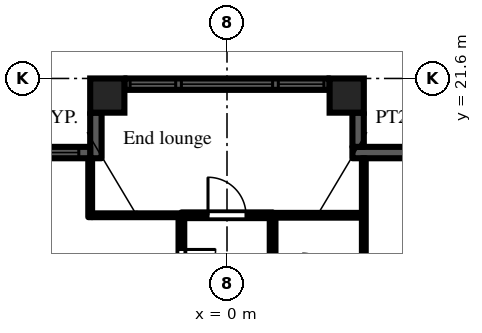
"""IFC4 building model, lengths in metres.
Left out: names, types, materials, properties, quantities, classifications, styles, units other than length and angle.
Written with IfcOpenShell. Run it as: python <this file> out.ifc"""

import sys

from ifc_helpers import new_model, si_unit, direction, frame, frame_2d, origin, origin_2d, place, context, subcontext, project, spatial, rectangle, extrude, element, fill, save


model = new_model("IFC4")
c1 = context("Model", 3, precision=1e-05, world=origin(), true_north=direction((0.0, 1.0)))
c2 = subcontext(c1, "Body", "Model", "MODEL_VIEW")
j1 = project(units=[si_unit("LENGTHUNIT", "METRE"), si_unit("PLANEANGLEUNIT", "RADIAN")], contexts=[c1])
p1 = place(None, origin())
s1 = spatial("IfcSite", under=j1, at=p1, CompositionType="ELEMENT")
p2 = place(p1, origin())
s2 = spatial("IfcBuilding", under=s1, at=p2, CompositionType="ELEMENT")
p3 = place(p2, frame((0.0, 0.0, 102.9)))
s3 = spatial("IfcBuildingStorey", under=s2, at=p3, CompositionType="ELEMENT", Elevation=102.9)
for number, where, z_axis, x_axis in (
    (1, (-3.15, 21.15, 0.0), (0.0, 0.0, 1.0), (1.0, 0.0, 0.0)),
    (2, (3.15, 21.15, 0.0), (0.0, 0.0, 1.0), (1.0, 0.0, 0.0)),
):
    element("IfcColumn", number, at=place(p3, frame(where, z_axis=z_axis, x_axis=x_axis)), inside=s3, PredefinedType="COLUMN", context=c2, shape_type="SweptSolid", body=[
        extrude(rectangle(XDim=0.9, YDim=0.9, at=origin_2d()), origin(), (0.0, 0.0, 1.0), 3.0),
    ])
p4 = place(p3, frame((5.1, 19.65, 0.0), z_axis=(0.0, 0.0, 1.0), x_axis=(-1.0, 0.0, 0.0)))
e3 = element("IfcWall", 3, at=p4, inside=s3, PredefinedType="SOLIDWALL", context=c2, shape_type="SweptSolid", body=[
    extrude(rectangle(XDim=1.8, YDim=0.3, at=frame_2d((0.9, 0.0))), origin(), (0.0, 0.0, 1.0), 2.575),
])
p5 = place(p3, frame((3.45, 19.8, 0.0), z_axis=(0.0, 0.0, 1.0), x_axis=(0.0, 1.0, 0.0)))
e4 = element("IfcWall", 4, at=p5, inside=s3, PredefinedType="SOLIDWALL", context=c2, shape_type="SweptSolid", body=[
    extrude(rectangle(XDim=0.9, YDim=0.3, at=frame_2d((0.45, 0.0))), origin(), (0.0, 0.0, 1.0), 2.575),
])
p6 = place(p3, frame((2.7, 21.45, 0.0), z_axis=(0.0, 0.0, 1.0), x_axis=(-1.0, 0.0, 0.0)))
e5 = element("IfcWall", 5, at=p6, inside=s3, PredefinedType="SOLIDWALL", context=c2, shape_type="SweptSolid", body=[
    extrude(rectangle(XDim=5.4, YDim=0.3, at=frame_2d((2.7, 0.0))), origin(), (0.0, 0.0, 1.0), 2.1),
])
p7 = place(p6, frame((1.5, 0.0, 0.2)))
e6 = element("IfcOpeningElement", 6, at=p7, cuts=e5, PredefinedType="OPENING", context=c2, shape_type="SweptSolid", body=[
    extrude(rectangle(XDim=2.4, YDim=1.85, at=frame_2d((1.2, 0.925))), frame((0.0, 0.16, 0.0), z_axis=(0.0, -1.0, 0.0), x_axis=(1.0, 0.0, 0.0)), (0.0, 0.0, 1.0), 0.32),
])
p8 = place(p6, frame((0.15, 0.0, 0.2)))
e7 = element("IfcOpeningElement", 7, at=p8, cuts=e5, PredefinedType="OPENING", context=c2, shape_type="SweptSolid", body=[
    extrude(rectangle(XDim=1.2, YDim=1.85, at=frame_2d((0.6, 0.925))), frame((0.0, 0.16, 0.0), z_axis=(0.0, -1.0, 0.0), x_axis=(1.0, 0.0, 0.0)), (0.0, 0.0, 1.0), 0.32),
])
p9 = place(p6, frame((4.05, 0.0, 0.2)))
e8 = element("IfcOpeningElement", 8, at=p9, cuts=e5, PredefinedType="OPENING", context=c2, shape_type="SweptSolid", body=[
    extrude(rectangle(XDim=1.2, YDim=1.85, at=frame_2d((0.6, 0.925))), frame((0.0, 0.16, 0.0), z_axis=(0.0, -1.0, 0.0), x_axis=(1.0, 0.0, 0.0)), (0.0, 0.0, 1.0), 0.32),
])
p10 = place(p3, frame((-3.45, 20.7, 0.0), z_axis=(0.0, 0.0, 1.0), x_axis=(0.0, -1.0, 0.0)))
e9 = element("IfcWall", 9, at=p10, inside=s3, PredefinedType="SOLIDWALL", context=c2, shape_type="SweptSolid", body=[
    extrude(rectangle(XDim=1.2, YDim=0.3, at=frame_2d((0.6, 0.0))), origin(), (0.0, 0.0, 1.0), 2.575),
])
p11 = place(p3, frame((-3.6, 19.65, 0.0), z_axis=(0.0, 0.0, 1.0), x_axis=(-1.0, 0.0, 0.0)))
e10 = element("IfcWall", 10, at=p11, inside=s3, PredefinedType="SOLIDWALL", context=c2, shape_type="SweptSolid", body=[
    extrude(rectangle(XDim=1.8, YDim=0.3, at=frame_2d((0.9, 0.0))), origin(), (0.0, 0.0, 1.0), 2.575),
])
p12 = place(p11, frame((0.3, 0.0, 0.2)))
e11 = element("IfcOpeningElement", 11, at=p12, cuts=e10, PredefinedType="OPENING", context=c2, shape_type="SweptSolid", body=[
    extrude(rectangle(XDim=1.2, YDim=1.85, at=frame_2d((0.6, 0.925))), frame((0.0, 0.16, 0.0), z_axis=(0.0, -1.0, 0.0), x_axis=(1.0, 0.0, 0.0)), (0.0, 0.0, 1.0), 0.32),
])
p13 = place(p3, frame((-3.6, 17.95, 0.0), z_axis=(0.0, 0.0, 1.0), x_axis=(0.0, 1.0, 0.0)))
e12 = element("IfcWall", 12, at=p13, inside=s3, PredefinedType="PARTITIONING", context=c2, shape_type="SweptSolid", body=[
    extrude(rectangle(XDim=1.55, YDim=0.1, at=frame_2d((0.775, 0.0))), origin(), (0.0, 0.0, 1.0), 2.575),
])
p14 = place(p3, frame((-3.55, 18.0, 0.0), z_axis=(0.0, 0.0, 1.0), x_axis=(1.0, 0.0, 0.0)))
e13 = element("IfcWall", 13, at=p14, inside=s3, PredefinedType="PARTITIONING", context=c2, shape_type="SweptSolid", body=[
    extrude(rectangle(XDim=2.35, YDim=0.1, at=frame_2d((1.175, 0.0))), origin(), (0.0, 0.0, 1.0), 2.575),
])
p15 = place(p3, frame((-1.2, 1.275, 0.0), z_axis=(0.0, 0.0, 1.0), x_axis=(0.0, 1.0, 0.0)))
e14 = element("IfcWall", 14, at=p15, inside=s3, PredefinedType="PARTITIONING", context=c2, shape_type="SweptSolid", body=[
    extrude(rectangle(XDim=16.65, YDim=0.15, at=frame_2d((8.325, 0.0))), origin(), (0.0, 0.0, 1.0), 2.575),
])
p16 = place(p15, frame((3.575, 0.0, 0.0)))
e15 = element("IfcOpeningElement", 15, at=p16, cuts=e14, PredefinedType="OPENING", context=c2, shape_type="SweptSolid", body=[
    extrude(rectangle(XDim=0.9, YDim=2.1, at=frame_2d((0.45, 1.05))), frame((0.0, 0.085, 0.0), z_axis=(0.0, -1.0, 0.0), x_axis=(1.0, 0.0, 0.0)), (0.0, 0.0, 1.0), 0.17),
])
p17 = place(p15, frame((6.875, 0.0, 0.0)))
e16 = element("IfcOpeningElement", 16, at=p17, cuts=e14, PredefinedType="OPENING", context=c2, shape_type="SweptSolid", body=[
    extrude(rectangle(XDim=0.9, YDim=2.1, at=frame_2d((0.45, 1.05))), frame((0.0, 0.085, 0.0), z_axis=(0.0, -1.0, 0.0), x_axis=(1.0, 0.0, 0.0)), (0.0, 0.0, 1.0), 0.17),
])
p18 = place(p15, frame((10.475, 0.0, 0.0)))
e17 = element("IfcOpeningElement", 17, at=p18, cuts=e14, PredefinedType="OPENING", context=c2, shape_type="SweptSolid", body=[
    extrude(rectangle(XDim=0.9, YDim=2.1, at=frame_2d((0.45, 1.05))), frame((0.0, 0.085, 0.0), z_axis=(0.0, -1.0, 0.0), x_axis=(1.0, 0.0, 0.0)), (0.0, 0.0, 1.0), 0.17),
])
p19 = place(p15, frame((14.025, 0.0, 0.0)))
e18 = element("IfcOpeningElement", 18, at=p19, cuts=e14, PredefinedType="OPENING", context=c2, shape_type="SweptSolid", body=[
    extrude(rectangle(XDim=1.8, YDim=2.1, at=frame_2d((0.9, 1.05))), frame((0.0, 0.085, 0.0), z_axis=(0.0, -1.0, 0.0), x_axis=(1.0, 0.0, 0.0)), (0.0, 0.0, 1.0), 0.17),
])
p20 = place(p3, frame((-1.2, 18.0, 0.0), z_axis=(0.0, 0.0, 1.0), x_axis=(1.0, 0.0, 0.0)))
e19 = element("IfcWall", 19, at=p20, inside=s3, PredefinedType="PARTITIONING", context=c2, shape_type="SweptSolid", body=[
    extrude(rectangle(XDim=2.4, YDim=0.15, at=frame_2d((1.2, 0.0))), origin(), (0.0, 0.0, 1.0), 2.575),
])
p21 = place(p20, frame((0.7, 0.0, 0.0)))
e20 = element("IfcOpeningElement", 20, at=p21, cuts=e19, PredefinedType="OPENING", context=c2, shape_type="SweptSolid", body=[
    extrude(rectangle(XDim=1.0, YDim=2.1, at=frame_2d((0.5, 1.05))), frame((0.0, 0.085, 0.0), z_axis=(0.0, -1.0, 0.0), x_axis=(1.0, 0.0, 0.0)), (0.0, 0.0, 1.0), 0.17),
])
p22 = place(p3, frame((1.2, 1.125, 0.0), z_axis=(0.0, 0.0, 1.0), x_axis=(0.0, 1.0, 0.0)))
e21 = element("IfcWall", 21, at=p22, inside=s3, PredefinedType="PARTITIONING", context=c2, shape_type="SweptSolid", body=[
    extrude(rectangle(XDim=16.8, YDim=0.15, at=frame_2d((8.4, 0.0))), origin(), (0.0, 0.0, 1.0), 2.575),
])
p23 = place(p22, frame((3.725, 0.0, 0.0)))
e22 = element("IfcOpeningElement", 22, at=p23, cuts=e21, PredefinedType="OPENING", context=c2, shape_type="SweptSolid", body=[
    extrude(rectangle(XDim=0.9, YDim=2.1, at=frame_2d((0.45, 1.05))), frame((0.0, 0.085, 0.0), z_axis=(0.0, -1.0, 0.0), x_axis=(1.0, 0.0, 0.0)), (0.0, 0.0, 1.0), 0.17),
])
p24 = place(p22, frame((11.425, 0.0, 0.0)))
e23 = element("IfcOpeningElement", 23, at=p24, cuts=e21, PredefinedType="OPENING", context=c2, shape_type="SweptSolid", body=[
    extrude(rectangle(XDim=0.9, YDim=2.1, at=frame_2d((0.45, 1.05))), frame((0.0, 0.085, 0.0), z_axis=(0.0, -1.0, 0.0), x_axis=(1.0, 0.0, 0.0)), (0.0, 0.0, 1.0), 0.17),
])
p25 = place(p22, frame((7.825, 0.0, 0.0)))
e24 = element("IfcOpeningElement", 24, at=p25, cuts=e21, PredefinedType="OPENING", context=c2, shape_type="SweptSolid", body=[
    extrude(rectangle(XDim=0.9, YDim=2.1, at=frame_2d((0.45, 1.05))), frame((0.0, 0.085, 0.0), z_axis=(0.0, -1.0, 0.0), x_axis=(1.0, 0.0, 0.0)), (0.0, 0.0, 1.0), 0.17),
])
p26 = place(p22, frame((13.475, 0.0, 0.0)))
e25 = element("IfcOpeningElement", 25, at=p26, cuts=e21, PredefinedType="OPENING", context=c2, shape_type="SweptSolid", body=[
    extrude(rectangle(XDim=1.0, YDim=2.1, at=frame_2d((0.5, 1.05))), frame((0.0, 0.085, 0.0), z_axis=(0.0, -1.0, 0.0), x_axis=(1.0, 0.0, 0.0)), (0.0, 0.0, 1.0), 0.17),
])
p27 = place(p3, frame((1.2, 18.0, 0.0), z_axis=(0.0, 0.0, 1.0), x_axis=(1.0, 0.0, 0.0)))
e26 = element("IfcWall", 26, at=p27, inside=s3, PredefinedType="PARTITIONING", context=c2, shape_type="SweptSolid", body=[
    extrude(rectangle(XDim=2.35, YDim=0.125, at=frame_2d((1.175, 0.0))), origin(), (0.0, 0.0, 1.0), 2.575),
])
p28 = place(p3, frame((3.6, 16.25, 0.0), z_axis=(0.0, 0.0, 1.0), x_axis=(0.0, 1.0, 0.0)))
e27 = element("IfcWall", 27, at=p28, inside=s3, PredefinedType="PARTITIONING", context=c2, shape_type="SweptSolid", body=[
    extrude(rectangle(XDim=3.25, YDim=0.1, at=frame_2d((1.625, 0.0))), origin(), (0.0, 0.0, 1.0), 2.575),
])
p29 = place(p7, origin())
e28 = element("IfcWindow", 28, at=p29, inside=s3, PartitioningType="SINGLE_PANEL", PredefinedType="WINDOW", context=c2, shape_type="SweptSolid", body=[
    extrude(rectangle(XDim=2.4, YDim=1.85, at=frame_2d((1.2, 0.925))), frame((0.0, 0.03, 0.0), z_axis=(0.0, -1.0, 0.0), x_axis=(1.0, 0.0, 0.0)), (0.0, 0.0, 1.0), 0.06),
])
fill(e6, e28)
p30 = place(p8, origin())
e29 = element("IfcWindow", 29, at=p30, inside=s3, PartitioningType="SINGLE_PANEL", PredefinedType="WINDOW", context=c2, shape_type="SweptSolid", body=[
    extrude(rectangle(XDim=1.2, YDim=1.85, at=frame_2d((0.6, 0.925))), frame((0.0, 0.03, 0.0), z_axis=(0.0, -1.0, 0.0), x_axis=(1.0, 0.0, 0.0)), (0.0, 0.0, 1.0), 0.06),
])
fill(e7, e29)
p31 = place(p9, origin())
e30 = element("IfcWindow", 30, at=p31, inside=s3, PartitioningType="SINGLE_PANEL", PredefinedType="WINDOW", context=c2, shape_type="SweptSolid", body=[
    extrude(rectangle(XDim=1.2, YDim=1.85, at=frame_2d((0.6, 0.925))), frame((0.0, 0.03, 0.0), z_axis=(0.0, -1.0, 0.0), x_axis=(1.0, 0.0, 0.0)), (0.0, 0.0, 1.0), 0.06),
])
fill(e8, e30)
p32 = place(p12, origin())
e31 = element("IfcWindow", 31, at=p32, inside=s3, PartitioningType="SINGLE_PANEL", PredefinedType="WINDOW", context=c2, shape_type="SweptSolid", body=[
    extrude(rectangle(XDim=1.2, YDim=1.85, at=frame_2d((0.6, 0.925))), frame((0.0, 0.03, 0.0), z_axis=(0.0, -1.0, 0.0), x_axis=(1.0, 0.0, 0.0)), (0.0, 0.0, 1.0), 0.06),
])
fill(e11, e31)
p33 = place(p21, origin())
e32 = element("IfcDoor", 32, at=p33, inside=s3, OperationType="SINGLE_SWING_LEFT", PredefinedType="DOOR", context=c2, shape_type="SweptSolid", body=[
    extrude(rectangle(XDim=1.0, YDim=2.1, at=frame_2d((0.5, 1.05))), frame((0.0, 0.025, 0.0), z_axis=(0.0, -1.0, 0.0), x_axis=(1.0, 0.0, 0.0)), (0.0, 0.0, 1.0), 0.05),
])
fill(e20, e32)
p34 = place(p19, frame((1.8, 0.0, 0.0), z_axis=(0.0, 0.0, 1.0), x_axis=(-1.0, 0.0, 0.0)))
e33 = element("IfcDoor", 33, at=p34, inside=s3, OperationType="DOUBLE_DOOR_DOUBLE_SWING", PredefinedType="DOOR", context=c2, shape_type="SweptSolid", body=[
    extrude(rectangle(XDim=1.8, YDim=2.1, at=frame_2d((0.9, 1.05))), frame((0.0, 0.025, 0.0), z_axis=(0.0, -1.0, 0.0), x_axis=(1.0, 0.0, 0.0)), (0.0, 0.0, 1.0), 0.05),
])
fill(e18, e33)
save(model, sys.argv[1])
